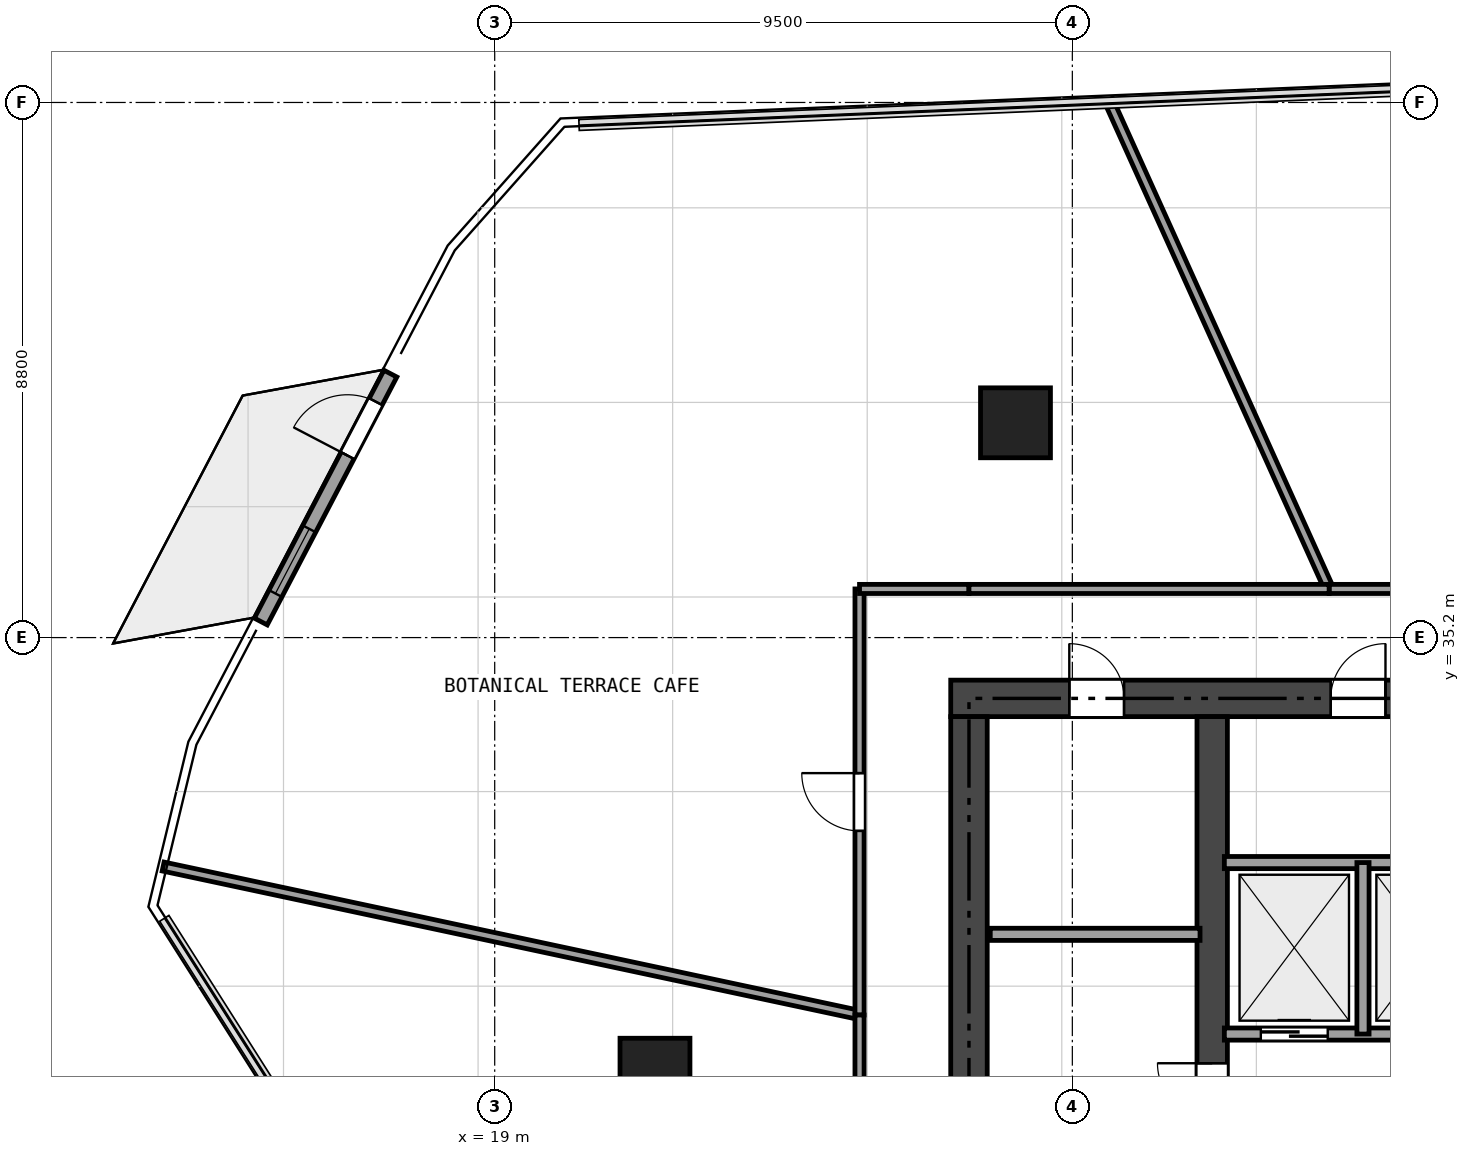
"""IFC4 building model, lengths in metres.
Left out: names, types, materials, properties, quantities, classifications, styles, units other than length and angle.
Written with IfcOpenShell. Run it as: python <this file> out.ifc"""

import sys

from ifc_helpers import new_model, si_unit, direction, frame, frame_2d, origin, origin_2d, place, context, subcontext, project, spatial, rectangle, extrude, element, fill, save


model = new_model("IFC4")
c1 = context("Model", 3, precision=1e-05, world=origin(), true_north=direction((0.0, 1.0)))
c2 = subcontext(c1, "Body", "Model", "MODEL_VIEW")
j1 = project(units=[si_unit("LENGTHUNIT", "METRE"), si_unit("PLANEANGLEUNIT", "RADIAN")], contexts=[c1])
p1 = place(None, origin())
s1 = spatial("IfcSite", under=j1, at=p1, CompositionType="ELEMENT")
p2 = place(p1, origin())
s2 = spatial("IfcBuilding", under=s1, at=p2, CompositionType="ELEMENT")
p3 = place(p2, frame((0.0, 0.0, 76.35)))
s3 = spatial("IfcBuildingStorey", under=s2, at=p3, CompositionType="ELEMENT", Elevation=76.35)
p4 = place(p3, frame((26.5, 34.2, 0.0), z_axis=(0.0, 0.0, 1.0), x_axis=(1.0, 0.0, 0.0)))
e1 = element("IfcWall", 1, at=p4, inside=s3, PredefinedType="SHEAR", context=c2, shape_type="SweptSolid", body=[
    extrude(rectangle(XDim=21.4, YDim=0.6, at=frame_2d((10.7, 0.0))), origin(), (0.0, 0.0, 1.0), 3.17),
])
p5 = place(p4, frame((9.7, 0.0, 0.0)))
e2 = element("IfcOpeningElement", 2, at=p5, cuts=e1, PredefinedType="OPENING", context=c2, shape_type="SweptSolid", body=[
    extrude(rectangle(XDim=1.1, YDim=2.15, at=frame_2d((0.55, 1.075))), frame((0.0, 0.31, 0.0), z_axis=(0.0, -1.0, 0.0), x_axis=(1.0, 0.0, 0.0)), (0.0, 0.0, 1.0), 0.62),
])
p6 = place(p4, frame((1.95, 0.0, 0.0)))
e3 = element("IfcOpeningElement", 3, at=p6, cuts=e1, PredefinedType="OPENING", context=c2, shape_type="SweptSolid", body=[
    extrude(rectangle(XDim=0.9, YDim=2.1, at=frame_2d((0.45, 1.05))), frame((0.0, 0.31, 0.0), z_axis=(0.0, -1.0, 0.0), x_axis=(1.0, 0.0, 0.0)), (0.0, 0.0, 1.0), 0.62),
])
p7 = place(p4, frame((6.25, 0.0, 0.0)))
e4 = element("IfcOpeningElement", 4, at=p7, cuts=e1, PredefinedType="OPENING", context=c2, shape_type="SweptSolid", body=[
    extrude(rectangle(XDim=0.9, YDim=2.1, at=frame_2d((0.45, 1.05))), frame((0.0, 0.31, 0.0), z_axis=(0.0, -1.0, 0.0), x_axis=(1.0, 0.0, 0.0)), (0.0, 0.0, 1.0), 0.62),
])
p8 = place(p3, frame((26.8, 18.9, 0.0), z_axis=(0.0, 0.0, 1.0), x_axis=(0.0, 1.0, 0.0)))
e5 = element("IfcWall", 5, at=p8, inside=s3, PredefinedType="SHEAR", context=c2, shape_type="SweptSolid", body=[
    extrude(rectangle(XDim=15.0, YDim=0.6, at=frame_2d((7.5, 0.0))), origin(), (0.0, 0.0, 1.0), 3.17),
])
p9 = place(p3, frame((30.8, 18.9, 0.0), z_axis=(0.0, 0.0, 1.0), x_axis=(0.0, 1.0, 0.0)))
e6 = element("IfcWall", 6, at=p9, inside=s3, PredefinedType="SHEAR", context=c2, shape_type="SweptSolid", body=[
    extrude(rectangle(XDim=15.0, YDim=0.5, at=frame_2d((7.5, 0.0))), origin(), (0.0, 0.0, 1.0), 3.17),
])
p10 = place(p9, frame((6.6, 0.0, 0.0)))
e7 = element("IfcOpeningElement", 7, at=p10, cuts=e6, PredefinedType="OPENING", context=c2, shape_type="SweptSolid", body=[
    extrude(rectangle(XDim=1.1, YDim=2.15, at=frame_2d((0.55, 1.075))), frame((0.0, 0.26, 0.0), z_axis=(0.0, -1.0, 0.0), x_axis=(1.0, 0.0, 0.0)), (0.0, 0.0, 1.0), 0.52),
])
p11 = place(p9, frame((8.4, 0.0, 0.0)))
e8 = element("IfcOpeningElement", 8, at=p11, cuts=e6, PredefinedType="OPENING", context=c2, shape_type="SweptSolid", body=[
    extrude(rectangle(XDim=0.9, YDim=2.1, at=frame_2d((0.45, 1.05))), frame((0.0, 0.26, 0.0), z_axis=(0.0, -1.0, 0.0), x_axis=(1.0, 0.0, 0.0)), (0.0, 0.0, 1.0), 0.52),
])
for number, where, z_axis, x_axis in (
    (9, (27.565, 38.732, -0.405), (0.0, 0.0, 1.0), (1.0, 0.0, 0.0)),
    (10, (21.636, 28.036, -0.405), (0.0, 0.0, 1.0), (1.0, 0.0, 0.0)),
):
    element("IfcColumn", number, at=place(p3, frame(where, z_axis=z_axis, x_axis=x_axis)), inside=s3, PredefinedType="COLUMN", context=c2, shape_type="SweptSolid", body=[
        extrude(rectangle(XDim=1.15, YDim=1.15, at=origin_2d()), origin(), (0.0, 0.0, 1.0), 3.575),
    ])
p12 = place(p3, frame((15.153, 35.464, 0.0), z_axis=(0.0, 0.0, 1.0), x_axis=(0.463211579043, 0.886247726677, 0.0)))
e11 = element("IfcWall", 11, at=p12, inside=s3, PredefinedType="SOLIDWALL", context=c2, shape_type="SweptSolid", body=[
    extrude(rectangle(XDim=4.6, YDim=0.24, at=frame_2d((2.3, 0.0))), origin(), (0.0, 0.0, 1.0), 3.17),
])
p13 = place(p12, frame((3.08, 0.0, 0.0)))
e12 = element("IfcOpeningElement", 12, at=p13, cuts=e11, PredefinedType="OPENING", context=c2, shape_type="SweptSolid", body=[
    extrude(rectangle(XDim=1.0, YDim=2.15, at=frame_2d((0.5, 1.075))), frame((0.0, 0.13, 0.0), z_axis=(0.0, -1.0, 0.0), x_axis=(1.0, 0.0, 0.0)), (0.0, 0.0, 1.0), 0.26),
])
p14 = place(p12, frame((0.52, 0.0, 0.2)))
e13 = element("IfcOpeningElement", 13, at=p14, cuts=e11, PredefinedType="OPENING", context=c2, shape_type="SweptSolid", body=[
    extrude(rectangle(XDim=1.2, YDim=1.8, at=frame_2d((0.6, 0.9))), frame((0.0, 0.13, 0.0), z_axis=(0.0, -1.0, 0.0), x_axis=(1.0, 0.0, 0.0)), (0.0, 0.0, 1.0), 0.26),
])
p15 = place(p3, frame((27.15, 30.32, 0.0), z_axis=(0.0, 0.0, 1.0), x_axis=(1.0, 0.0, 0.0)))
e14 = element("IfcWall", 14, at=p15, inside=s3, PredefinedType="SOLIDWALL", context=c2, shape_type="SweptSolid", body=[
    extrude(rectangle(XDim=3.45, YDim=0.2, at=frame_2d((1.725, 0.0))), origin(), (0.0, 0.0, 1.0), 3.17),
])
p16 = place(p3, frame((31.0, 28.68, 0.0), z_axis=(0.0, 0.0, 1.0), x_axis=(1.0, 0.0, 0.0)))
e15 = element("IfcWall", 15, at=p16, inside=s3, PredefinedType="SOLIDWALL", context=c2, shape_type="SweptSolid", body=[
    extrude(rectangle(XDim=4.42, YDim=0.2, at=frame_2d((2.21, 0.0))), origin(), (0.0, 0.0, 1.0), 3.17),
])
p17 = place(p16, frame((0.6, 0.0, 0.0)))
e16 = element("IfcOpeningElement", 16, at=p17, cuts=e15, PredefinedType="OPENING", context=c2, shape_type="SweptSolid", body=[
    extrude(rectangle(XDim=1.1, YDim=2.15, at=frame_2d((0.55, 1.075))), frame((0.0, 0.11, 0.0), z_axis=(0.0, -1.0, 0.0), x_axis=(1.0, 0.0, 0.0)), (0.0, 0.0, 1.0), 0.22),
])
p18 = place(p16, frame((2.85, 0.0, 0.0)))
e17 = element("IfcOpeningElement", 17, at=p18, cuts=e15, PredefinedType="OPENING", context=c2, shape_type="SweptSolid", body=[
    extrude(rectangle(XDim=1.1, YDim=2.15, at=frame_2d((0.55, 1.075))), frame((0.0, 0.11, 0.0), z_axis=(0.0, -1.0, 0.0), x_axis=(1.0, 0.0, 0.0)), (0.0, 0.0, 1.0), 0.22),
])
p19 = place(p3, frame((31.0, 31.5, 0.0), z_axis=(0.0, 0.0, 1.0), x_axis=(1.0, 0.0, 0.0)))
e18 = element("IfcWall", 18, at=p19, inside=s3, PredefinedType="SOLIDWALL", context=c2, shape_type="SweptSolid", body=[
    extrude(rectangle(XDim=4.42, YDim=0.2, at=frame_2d((2.21, 0.0))), origin(), (0.0, 0.0, 1.0), 3.17),
])
p20 = place(p3, frame((33.28, 28.68, 0.0), z_axis=(0.0, 0.0, 1.0), x_axis=(0.0, 1.0, 0.0)))
e19 = element("IfcWall", 19, at=p20, inside=s3, PredefinedType="SOLIDWALL", context=c2, shape_type="SweptSolid", body=[
    extrude(rectangle(XDim=2.82, YDim=0.2, at=frame_2d((1.41, 0.0))), origin(), (0.0, 0.0, 1.0), 3.17),
])
p21 = place(p3, frame((29.093, 44.04, 0.0), z_axis=(0.0, 0.0, 1.0), x_axis=(0.41148290583, -0.911417477455, 0.0)))
e20 = element("IfcWall", 20, at=p21, inside=s3, PredefinedType="PARTITIONING", context=c2, shape_type="SweptSolid", body=[
    extrude(rectangle(XDim=8.822, YDim=0.15, at=frame_2d((4.411, 0.0))), origin(), (0.0, 0.0, 1.0), 2.455),
])
p22 = place(p3, frame((32.723, 36.0, 0.0), z_axis=(0.0, 0.0, 1.0), x_axis=(1.0, 0.0, 0.0)))
e21 = element("IfcWall", 21, at=p22, inside=s3, PredefinedType="PARTITIONING", context=c2, shape_type="SweptSolid", body=[
    extrude(rectangle(XDim=8.954, YDim=0.15, at=frame_2d((4.477, 0.0))), origin(), (0.0, 0.0, 1.0), 2.467),
])
p23 = place(p22, frame((4.002, 0.0, 0.0)))
e22 = element("IfcOpeningElement", 22, at=p23, cuts=e21, PredefinedType="OPENING", context=c2, shape_type="SweptSolid", body=[
    extrude(rectangle(XDim=0.95, YDim=2.15, at=frame_2d((0.475, 1.075))), frame((0.0, 0.085, 0.0), z_axis=(0.0, -1.0, 0.0), x_axis=(1.0, 0.0, 0.0)), (0.0, 0.0, 1.0), 0.17),
])
p24 = place(p3, frame((13.547, 31.435, 0.0), z_axis=(0.0, 0.0, 1.0), x_axis=(0.978012740802, -0.208545148179, 0.0)))
e23 = element("IfcWall", 23, at=p24, inside=s3, PredefinedType="PARTITIONING", context=c2, shape_type="SweptSolid", body=[
    extrude(rectangle(XDim=11.71, YDim=0.15, at=frame_2d((5.855, 0.0))), origin(), (0.0, 0.0, 1.0), 2.455),
])
p25 = place(p3, frame((25.0, 28.993, 0.0), z_axis=(0.0, 0.0, 1.0), x_axis=(0.0, 1.0, 0.0)))
e24 = element("IfcWall", 24, at=p25, inside=s3, PredefinedType="PARTITIONING", context=c2, shape_type="SweptSolid", body=[
    extrude(rectangle(XDim=7.007, YDim=0.15, at=frame_2d((3.503, 0.0))), origin(), (0.0, 0.0, 1.0), 2.455),
])
p26 = place(p25, frame((3.028, 0.0, 0.0)))
e25 = element("IfcOpeningElement", 25, at=p26, cuts=e24, PredefinedType="OPENING", context=c2, shape_type="SweptSolid", body=[
    extrude(rectangle(XDim=0.95, YDim=2.15, at=frame_2d((0.475, 1.075))), frame((0.0, 0.085, 0.0), z_axis=(0.0, -1.0, 0.0), x_axis=(1.0, 0.0, 0.0)), (0.0, 0.0, 1.0), 0.17),
])
p27 = place(p3, frame((25.0, 36.0, 0.0), z_axis=(0.0, 0.0, 1.0), x_axis=(1.0, 0.0, 0.0)))
e26 = element("IfcWall", 26, at=p27, inside=s3, PredefinedType="PARTITIONING", context=c2, shape_type="SweptSolid", body=[
    extrude(rectangle(XDim=1.8, YDim=0.15, at=frame_2d((0.9, 0.0))), origin(), (0.0, 0.0, 1.0), 2.455),
])
p28 = place(p3, frame((26.8, 36.0, 0.0), z_axis=(0.0, 0.0, 1.0), x_axis=(1.0, 0.0, 0.0)))
e27 = element("IfcWall", 27, at=p28, inside=s3, PredefinedType="PARTITIONING", context=c2, shape_type="SweptSolid", body=[
    extrude(rectangle(XDim=5.923, YDim=0.15, at=frame_2d((2.961, 0.0))), origin(), (0.0, 0.0, 1.0), 2.467),
])
p29 = place(p3, frame((25.0, 18.6, 0.0), z_axis=(0.0, 0.0, 1.0), x_axis=(0.0, 1.0, 0.0)))
e28 = element("IfcWall", 28, at=p29, inside=s3, PredefinedType="PARTITIONING", context=c2, shape_type="SweptSolid", body=[
    extrude(rectangle(XDim=10.393, YDim=0.15, at=frame_2d((5.196, 0.0))), origin(), (0.0, 0.0, 1.0), 2.467),
])
p30 = place(p29, frame((4.721, 0.0, 0.0)))
e29 = element("IfcOpeningElement", 29, at=p30, cuts=e28, PredefinedType="OPENING", context=c2, shape_type="SweptSolid", body=[
    extrude(rectangle(XDim=0.95, YDim=2.15, at=frame_2d((0.475, 1.075))), frame((0.0, 0.085, 0.0), z_axis=(0.0, -1.0, 0.0), x_axis=(1.0, 0.0, 0.0)), (0.0, 0.0, 1.0), 0.17),
])
p31 = place(p13, origin())
e30 = element("IfcDoor", 30, at=p31, inside=s3, OperationType="SINGLE_SWING_LEFT", PredefinedType="DOOR", context=c2, shape_type="SweptSolid", body=[
    extrude(rectangle(XDim=1.0, YDim=2.15, at=frame_2d((0.5, 1.075))), frame((0.0, 0.025, 0.0), z_axis=(0.0, -1.0, 0.0), x_axis=(1.0, 0.0, 0.0)), (0.0, 0.0, 1.0), 0.05),
])
fill(e12, e30)
p32 = place(p14, origin())
e31 = element("IfcWindow", 31, at=p32, inside=s3, PartitioningType="SINGLE_PANEL", PredefinedType="WINDOW", context=c2, shape_type="SweptSolid", body=[
    extrude(rectangle(XDim=1.2, YDim=1.8, at=frame_2d((0.6, 0.9))), frame((0.0, 0.03, 0.0), z_axis=(0.0, -1.0, 0.0), x_axis=(1.0, 0.0, 0.0)), (0.0, 0.0, 1.0), 0.06),
])
fill(e13, e31)
p33 = place(p11, origin())
e32 = element("IfcDoor", 32, at=p33, inside=s3, OperationType="SINGLE_SWING_RIGHT", PredefinedType="DOOR", context=c2, shape_type="SweptSolid", body=[
    extrude(rectangle(XDim=0.9, YDim=2.1, at=frame_2d((0.45, 1.05))), frame((0.0, 0.025, 0.0), z_axis=(0.0, -1.0, 0.0), x_axis=(1.0, 0.0, 0.0)), (0.0, 0.0, 1.0), 0.05),
])
fill(e8, e32)
p34 = place(p6, origin())
e33 = element("IfcDoor", 33, at=p34, inside=s3, OperationType="SINGLE_SWING_LEFT", PredefinedType="DOOR", context=c2, shape_type="SweptSolid", body=[
    extrude(rectangle(XDim=0.9, YDim=2.1, at=frame_2d((0.45, 1.05))), frame((0.0, 0.025, 0.0), z_axis=(0.0, -1.0, 0.0), x_axis=(1.0, 0.0, 0.0)), (0.0, 0.0, 1.0), 0.05),
])
fill(e3, e33)
p35 = place(p7, origin())
e34 = element("IfcDoor", 34, at=p35, inside=s3, OperationType="SINGLE_SWING_RIGHT", PredefinedType="DOOR", context=c2, shape_type="SweptSolid", body=[
    extrude(rectangle(XDim=0.9, YDim=2.1, at=frame_2d((0.45, 1.05))), frame((0.0, 0.025, 0.0), z_axis=(0.0, -1.0, 0.0), x_axis=(1.0, 0.0, 0.0)), (0.0, 0.0, 1.0), 0.05),
])
fill(e4, e34)
p36 = place(p17, origin())
e35 = element("IfcDoor", 35, at=p36, inside=s3, OperationType="SLIDING_TO_LEFT", PredefinedType="DOOR", context=c2, shape_type="SweptSolid", body=[
    extrude(rectangle(XDim=1.1, YDim=2.15, at=frame_2d((0.55, 1.075))), frame((0.0, 0.025, 0.0), z_axis=(0.0, -1.0, 0.0), x_axis=(1.0, 0.0, 0.0)), (0.0, 0.0, 1.0), 0.05),
])
fill(e16, e35)
p37 = place(p26, origin())
e36 = element("IfcDoor", 36, at=p37, inside=s3, OperationType="SINGLE_SWING_RIGHT", PredefinedType="DOOR", context=c2, shape_type="SweptSolid", body=[
    extrude(rectangle(XDim=0.95, YDim=2.15, at=frame_2d((0.475, 1.075))), frame((0.0, 0.025, 0.0), z_axis=(0.0, -1.0, 0.0), x_axis=(1.0, 0.0, 0.0)), (0.0, 0.0, 1.0), 0.05),
])
fill(e25, e36)
save(model, sys.argv[1])
